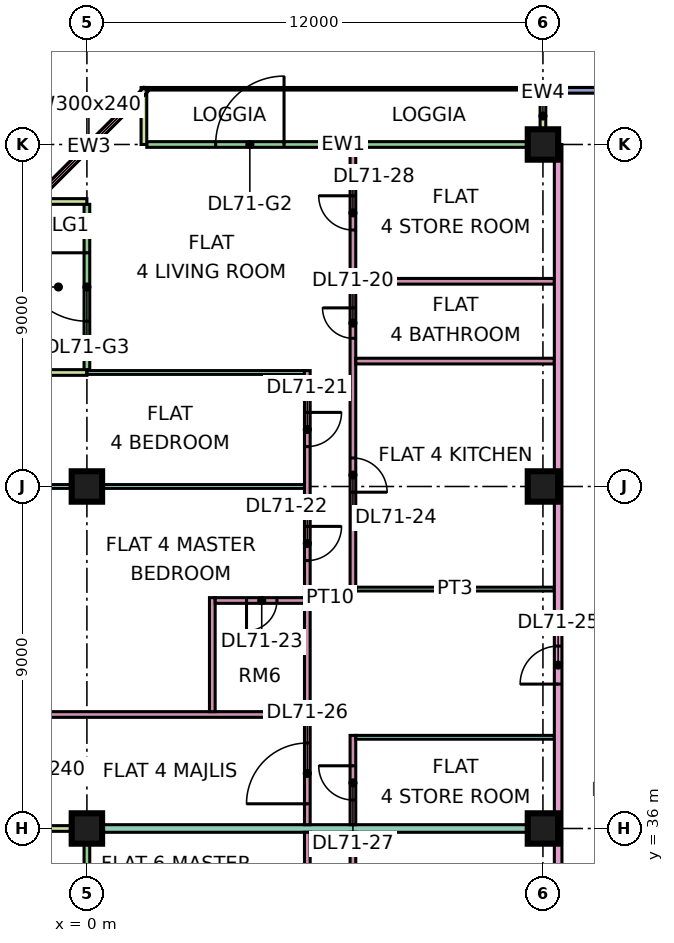
"""IFC4 building model, lengths in metres.
Left out: names, types, materials, properties, quantities, classifications, styles, units other than length and angle.
Written with IfcOpenShell. Run it as: python <this file> out.ifc"""

import sys

from ifc_helpers import new_model, si_unit, direction, frame, frame_2d, origin, origin_2d, place, context, subcontext, project, spatial, rectangle, extrude, element, fill, save


model = new_model("IFC4")
c1 = context("Model", 3, precision=1e-05, world=origin(), true_north=direction((0.0, 1.0)))
c2 = subcontext(c1, "Body", "Model", "MODEL_VIEW")
j1 = project(units=[si_unit("LENGTHUNIT", "METRE"), si_unit("PLANEANGLEUNIT", "RADIAN")], contexts=[c1])
p1 = place(None, origin())
s1 = spatial("IfcSite", under=j1, at=p1, CompositionType="ELEMENT")
p2 = place(p1, origin())
s2 = spatial("IfcBuilding", under=s1, at=p2, CompositionType="ELEMENT")
p3 = place(p2, frame((0.0, 0.0, 303.4)))
s3 = spatial("IfcBuildingStorey", under=s2, at=p3, CompositionType="ELEMENT", Elevation=303.4)
p4 = place(p3, frame((0.0, 36.0, 0.0), z_axis=(0.0, 0.0, 1.0), x_axis=(1.0, 0.0, 0.0)))
e1 = element("IfcColumn", 1, at=p4, inside=s3, PredefinedType="COLUMN", context=c2, shape_type="SweptSolid", body=[
    extrude(rectangle(XDim=0.8, YDim=0.8, at=origin_2d()), origin(), (0.0, 0.0, 1.0), 3.75),
])
for number, where, z_axis, x_axis in (
    (2, (0.0, 45.0, 0.0), (0.0, 0.0, 1.0), (1.0, 0.0, 0.0)),
    (3, (12.0, 36.0, 0.0), (0.0, 0.0, 1.0), (1.0, 0.0, 0.0)),
    (4, (12.0, 45.0, 0.0), (0.0, 0.0, 1.0), (1.0, 0.0, 0.0)),
    (5, (12.0, 54.0, 0.0), (0.0, 0.0, 1.0), (1.0, 0.0, 0.0)),
):
    element("IfcColumn", number, at=place(p3, frame(where, z_axis=z_axis, x_axis=x_axis)), inside=s3, PredefinedType="COLUMN", context=c2, shape_type="SweptSolid", body=[
        extrude(rectangle(XDim=0.8, YDim=0.8, at=origin_2d()), origin(), (0.0, 0.0, 1.0), 3.75),
    ])
p5 = place(p3, frame((22.5, 55.425, 0.0), z_axis=(0.0, 0.0, 1.0), x_axis=(-1.0, 0.0, 0.0)))
e6 = element("IfcWall", 6, at=p5, inside=s3, PredefinedType="SOLIDWALL", context=c2, shape_type="SweptSolid", body=[
    extrude(rectangle(XDim=10.425, YDim=0.15, at=frame_2d((5.212, 0.0))), origin(), (0.0, 0.0, 1.0), 3.35),
])
p6 = place(p5, frame((1.05, 0.0, 0.45)))
e7 = element("IfcOpeningElement", 7, at=p6, cuts=e6, PredefinedType="OPENING", context=c2, shape_type="SweptSolid", body=[
    extrude(rectangle(XDim=4.8, YDim=2.4, at=frame_2d((2.4, 1.2))), frame((0.0, 0.085, 0.0), z_axis=(0.0, -1.0, 0.0), x_axis=(1.0, 0.0, 0.0)), (0.0, 0.0, 1.0), 0.17),
])
p7 = place(p3, frame((11.925, 54.0, 0.0), z_axis=(0.0, 0.0, 1.0), x_axis=(-1.0, 0.0, 0.0)))
e8 = element("IfcWall", 8, at=p7, inside=s3, PredefinedType="SOLIDWALL", context=c2, shape_type="SweptSolid", body=[
    extrude(rectangle(XDim=10.35, YDim=0.15, at=frame_2d((5.175, 0.0))), origin(), (0.0, 0.0, 1.0), 3.35),
])
p8 = place(p7, frame((6.738, 0.0, 0.0)))
e9 = element("IfcOpeningElement", 9, at=p8, cuts=e8, PredefinedType="OPENING", context=c2, shape_type="SweptSolid", body=[
    extrude(rectangle(XDim=1.8, YDim=2.4, at=frame_2d((0.9, 1.2))), frame((0.0, 0.085, 0.0), z_axis=(0.0, -1.0, 0.0), x_axis=(1.0, 0.0, 0.0)), (0.0, 0.0, 1.0), 0.17),
])
for number, where, z_axis, x_axis in (
    (10, (12.0, 55.5, 0.0), (0.0, 0.0, 1.0), (0.0, -1.0, 0.0)),
    (11, (1.5, 55.5, 0.0), (0.0, 0.0, 1.0), (0.0, -1.0, 0.0)),
):
    element("IfcWall", number, at=place(p3, frame(where, z_axis=z_axis, x_axis=x_axis)), inside=s3, PredefinedType="SOLIDWALL", context=c2, shape_type="SweptSolid", body=[
        extrude(rectangle(XDim=1.5, YDim=0.15, at=frame_2d((0.75, 0.0))), origin(), (0.0, 0.0, 1.0), 3.35),
    ])
p9 = place(p3, frame((1.553, 55.447, 0.0), z_axis=(0.0, 0.0, 1.0), x_axis=(-0.707106781187, -0.707106781187, 0.0)))
e12 = element("IfcWall", 12, at=p9, inside=s3, PredefinedType="SOLIDWALL", context=c2, shape_type="SweptSolid", body=[
    extrude(rectangle(XDim=4.243, YDim=0.15, at=frame_2d((2.121, 0.0))), origin(), (0.0, 0.0, 1.0), 3.35),
])
p10 = place(p9, frame((0.621, 0.0, 0.45)))
e13 = element("IfcOpeningElement", 13, at=p10, cuts=e12, PredefinedType="OPENING", context=c2, shape_type="SweptSolid", body=[
    extrude(rectangle(XDim=3.0, YDim=2.4, at=frame_2d((1.5, 1.2))), frame((0.0, 0.085, 0.0), z_axis=(0.0, -1.0, 0.0), x_axis=(1.0, 0.0, 0.0)), (0.0, 0.0, 1.0), 0.17),
])
p11 = place(p3, frame((0.0, 52.425, 0.0), z_axis=(0.0, 0.0, 1.0), x_axis=(0.0, -1.0, 0.0)))
e14 = element("IfcWall", 14, at=p11, inside=s3, PredefinedType="SOLIDWALL", context=c2, shape_type="SweptSolid", body=[
    extrude(rectangle(XDim=4.35, YDim=0.15, at=frame_2d((2.175, 0.0))), origin(), (0.0, 0.0, 1.0), 3.35),
])
p12 = place(p11, frame((1.275, 0.0, 0.0)))
e15 = element("IfcOpeningElement", 15, at=p12, cuts=e14, PredefinedType="OPENING", context=c2, shape_type="SweptSolid", body=[
    extrude(rectangle(XDim=1.8, YDim=2.4, at=frame_2d((0.9, 1.2))), frame((0.0, 0.085, 0.0), z_axis=(0.0, -1.0, 0.0), x_axis=(1.0, 0.0, 0.0)), (0.0, 0.0, 1.0), 0.17),
])
for number, where, z_axis, x_axis in (
    (16, (-1.5, 52.5, 0.0), (0.0, 0.0, 1.0), (1.0, 0.0, 0.0)),
    (17, (-1.5, 48.0, 0.0), (0.0, 0.0, 1.0), (1.0, 0.0, 0.0)),
):
    element("IfcWall", number, at=place(p3, frame(where, z_axis=z_axis, x_axis=x_axis)), inside=s3, PredefinedType="SOLIDWALL", context=c2, shape_type="SweptSolid", body=[
        extrude(rectangle(XDim=1.5, YDim=0.15, at=frame_2d((0.75, 0.0))), origin(), (0.0, 0.0, 1.0), 3.35),
    ])
p13 = place(p3, frame((0.0, 35.925, 0.0), z_axis=(0.0, 0.0, 1.0), x_axis=(0.0, -1.0, 0.0)))
e18 = element("IfcWall", 18, at=p13, inside=s3, PredefinedType="SOLIDWALL", context=c2, shape_type="SweptSolid", body=[
    extrude(rectangle(XDim=11.85, YDim=0.15, at=frame_2d((5.925, 0.0))), origin(), (0.0, 0.0, 1.0), 3.35),
])
p14 = place(p13, frame((2.275, 0.0, 0.0)))
e19 = element("IfcOpeningElement", 19, at=p14, cuts=e18, PredefinedType="OPENING", context=c2, shape_type="SweptSolid", body=[
    extrude(rectangle(XDim=1.8, YDim=2.4, at=frame_2d((0.9, 1.2))), frame((0.0, 0.085, 0.0), z_axis=(0.0, -1.0, 0.0), x_axis=(1.0, 0.0, 0.0)), (0.0, 0.0, 1.0), 0.17),
])
p15 = place(p13, frame((6.525, 0.0, 0.45)))
e20 = element("IfcOpeningElement", 20, at=p15, cuts=e18, PredefinedType="OPENING", context=c2, shape_type="SweptSolid", body=[
    extrude(rectangle(XDim=1.8, YDim=2.4, at=frame_2d((0.9, 1.2))), frame((0.0, 0.085, 0.0), z_axis=(0.0, -1.0, 0.0), x_axis=(1.0, 0.0, 0.0)), (0.0, 0.0, 1.0), 0.17),
])
p16 = place(p13, frame((9.275, 0.0, 0.45)))
e21 = element("IfcOpeningElement", 21, at=p16, cuts=e18, PredefinedType="OPENING", context=c2, shape_type="SweptSolid", body=[
    extrude(rectangle(XDim=1.8, YDim=2.4, at=frame_2d((0.9, 1.2))), frame((0.0, 0.085, 0.0), z_axis=(0.0, -1.0, 0.0), x_axis=(1.0, 0.0, 0.0)), (0.0, 0.0, 1.0), 0.17),
])
p17 = place(p3, frame((-1.5, 36.0, 0.0), z_axis=(0.0, 0.0, 1.0), x_axis=(1.0, 0.0, 0.0)))
e22 = element("IfcWall", 22, at=p17, inside=s3, PredefinedType="SOLIDWALL", context=c2, shape_type="SweptSolid", body=[
    extrude(rectangle(XDim=1.5, YDim=0.15, at=frame_2d((0.75, 0.0))), origin(), (0.0, 0.0, 1.0), 3.35),
])
p18 = place(p3, frame((-1.351, 39.0, 0.0), z_axis=(0.0, 0.0, 1.0), x_axis=(1.0, 0.0, 0.0)))
e23 = element("IfcWall", 23, at=p18, inside=s3, PredefinedType="PARTITIONING", context=c2, shape_type="SweptSolid", body=[
    extrude(rectangle(XDim=7.076, YDim=0.15, at=frame_2d((3.538, 0.0))), origin(), (0.0, 0.0, 1.0), 3.35),
])
p19 = place(p3, frame((-1.351, 45.0, 0.0), z_axis=(0.0, 0.0, 1.0), x_axis=(1.0, 0.0, 0.0)))
e24 = element("IfcWall", 24, at=p19, inside=s3, PredefinedType="PARTITIONING", context=c2, shape_type="SweptSolid", body=[
    extrude(rectangle(XDim=7.076, YDim=0.1, at=frame_2d((3.538, 0.0))), origin(), (0.0, 0.0, 1.0), 3.35),
])
e25 = element("IfcWall", 25, at=p4, inside=s3, PredefinedType="PARTITIONING", context=c2, shape_type="SweptSolid", body=[
    extrude(rectangle(XDim=12.3, YDim=0.2, at=frame_2d((6.15, 0.0))), origin(), (0.0, 0.0, 1.0), 3.35),
])
p20 = place(p3, frame((0.0, 48.0, 0.0), z_axis=(0.0, 0.0, 1.0), x_axis=(1.0, 0.0, 0.0)))
e26 = element("IfcWall", 26, at=p20, inside=s3, PredefinedType="PARTITIONING", context=c2, shape_type="SweptSolid", body=[
    extrude(rectangle(XDim=5.725, YDim=0.1, at=frame_2d((2.863, 0.0))), origin(), (0.0, 0.0, 1.0), 3.35),
])
p21 = place(p3, frame((3.3, 39.075, 0.0), z_axis=(0.0, 0.0, 1.0), x_axis=(0.0, 1.0, 0.0)))
e27 = element("IfcWall", 27, at=p21, inside=s3, PredefinedType="PARTITIONING", context=c2, shape_type="SweptSolid", body=[
    extrude(rectangle(XDim=3.0, YDim=0.15, at=frame_2d((1.5, 0.0))), origin(), (0.0, 0.0, 1.0), 3.35),
])
p22 = place(p3, frame((3.375, 42.0, 0.0), z_axis=(0.0, 0.0, 1.0), x_axis=(1.0, 0.0, 0.0)))
e28 = element("IfcWall", 28, at=p22, inside=s3, PredefinedType="PARTITIONING", context=c2, shape_type="SweptSolid", body=[
    extrude(rectangle(XDim=2.35, YDim=0.15, at=frame_2d((1.175, 0.0))), origin(), (0.0, 0.0, 1.0), 3.35),
])
p23 = place(p22, frame((0.825, 0.0, 0.0)))
e29 = element("IfcOpeningElement", 29, at=p23, cuts=e28, PredefinedType="OPENING", context=c2, shape_type="SweptSolid", body=[
    extrude(rectangle(XDim=0.8, YDim=2.1, at=frame_2d((0.4, 1.05))), frame((0.0, 0.085, 0.0), z_axis=(0.0, -1.0, 0.0), x_axis=(1.0, 0.0, 0.0)), (0.0, 0.0, 1.0), 0.17),
])
p24 = place(p3, frame((5.8, 29.925, 0.0), z_axis=(0.0, 0.0, 1.0), x_axis=(0.0, 1.0, 0.0)))
e30 = element("IfcWall", 30, at=p24, inside=s3, PredefinedType="PARTITIONING", context=c2, shape_type="SweptSolid", body=[
    extrude(rectangle(XDim=5.975, YDim=0.15, at=frame_2d((2.987, 0.0))), origin(), (0.0, 0.0, 1.0), 3.35),
])
p25 = place(p24, frame((4.125, 0.0, 0.0)))
e31 = element("IfcOpeningElement", 31, at=p25, cuts=e30, PredefinedType="OPENING", context=c2, shape_type="SweptSolid", body=[
    extrude(rectangle(XDim=0.9, YDim=2.1, at=frame_2d((0.45, 1.05))), frame((0.0, 0.085, 0.0), z_axis=(0.0, -1.0, 0.0), x_axis=(1.0, 0.0, 0.0)), (0.0, 0.0, 1.0), 0.17),
])
p26 = place(p3, frame((5.8, 36.1, 0.0), z_axis=(0.0, 0.0, 1.0), x_axis=(0.0, 1.0, 0.0)))
e32 = element("IfcWall", 32, at=p26, inside=s3, PredefinedType="PARTITIONING", context=c2, shape_type="SweptSolid", body=[
    extrude(rectangle(XDim=11.95, YDim=0.15, at=frame_2d((5.975, 0.0))), origin(), (0.0, 0.0, 1.0), 3.35),
])
p27 = place(p26, frame((9.95, 0.0, 0.0)))
e33 = element("IfcOpeningElement", 33, at=p27, cuts=e32, PredefinedType="OPENING", context=c2, shape_type="SweptSolid", body=[
    extrude(rectangle(XDim=0.9, YDim=2.1, at=frame_2d((0.45, 1.05))), frame((0.0, 0.085, 0.0), z_axis=(0.0, -1.0, 0.0), x_axis=(1.0, 0.0, 0.0)), (0.0, 0.0, 1.0), 0.17),
])
p28 = place(p26, frame((6.95, 0.0, 0.0)))
e34 = element("IfcOpeningElement", 34, at=p28, cuts=e32, PredefinedType="OPENING", context=c2, shape_type="SweptSolid", body=[
    extrude(rectangle(XDim=0.9, YDim=2.1, at=frame_2d((0.45, 1.05))), frame((0.0, 0.085, 0.0), z_axis=(0.0, -1.0, 0.0), x_axis=(1.0, 0.0, 0.0)), (0.0, 0.0, 1.0), 0.17),
])
p29 = place(p26, frame((0.55, 0.0, 0.0)))
e35 = element("IfcOpeningElement", 35, at=p29, cuts=e32, PredefinedType="OPENING", context=c2, shape_type="SweptSolid", body=[
    extrude(rectangle(XDim=1.6, YDim=2.1, at=frame_2d((0.8, 1.05))), frame((0.0, 0.085, 0.0), z_axis=(0.0, -1.0, 0.0), x_axis=(1.0, 0.0, 0.0)), (0.0, 0.0, 1.0), 0.17),
])
p30 = place(p3, frame((7.0, 26.325, 0.0), z_axis=(0.0, 0.0, 1.0), x_axis=(0.0, 1.0, 0.0)))
e36 = element("IfcWall", 36, at=p30, inside=s3, PredefinedType="PARTITIONING", context=c2, shape_type="SweptSolid", body=[
    extrude(rectangle(XDim=9.575, YDim=0.15, at=frame_2d((4.788, 0.0))), origin(), (0.0, 0.0, 1.0), 3.35),
])
p31 = place(p30, frame((6.525, 0.0, 0.0)))
e37 = element("IfcOpeningElement", 37, at=p31, cuts=e36, PredefinedType="OPENING", context=c2, shape_type="SweptSolid", body=[
    extrude(rectangle(XDim=0.9, YDim=2.1, at=frame_2d((0.45, 1.05))), frame((0.0, 0.085, 0.0), z_axis=(0.0, -1.0, 0.0), x_axis=(1.0, 0.0, 0.0)), (0.0, 0.0, 1.0), 0.17),
])
p32 = place(p3, frame((7.0, 36.1, 0.0), z_axis=(0.0, 0.0, 1.0), x_axis=(0.0, 1.0, 0.0)))
e38 = element("IfcWall", 38, at=p32, inside=s3, PredefinedType="PARTITIONING", context=c2, shape_type="SweptSolid", body=[
    extrude(rectangle(XDim=2.35, YDim=0.15, at=frame_2d((1.175, 0.0))), origin(), (0.0, 0.0, 1.0), 3.35),
])
p33 = place(p32, frame((0.65, 0.0, 0.0)))
e39 = element("IfcOpeningElement", 39, at=p33, cuts=e38, PredefinedType="OPENING", context=c2, shape_type="SweptSolid", body=[
    extrude(rectangle(XDim=0.9, YDim=2.1, at=frame_2d((0.45, 1.05))), frame((0.0, 0.085, 0.0), z_axis=(0.0, -1.0, 0.0), x_axis=(1.0, 0.0, 0.0)), (0.0, 0.0, 1.0), 0.17),
])
p34 = place(p3, frame((7.0, 42.25, 0.0), z_axis=(0.0, 0.0, 1.0), x_axis=(0.0, 1.0, 0.0)))
e40 = element("IfcWall", 40, at=p34, inside=s3, PredefinedType="PARTITIONING", context=c2, shape_type="SweptSolid", body=[
    extrude(rectangle(XDim=11.676, YDim=0.15, at=frame_2d((5.838, 0.0))), origin(), (0.0, 0.0, 1.0), 3.35),
])
p35 = place(p34, frame((6.65, 0.0, 0.0)))
e41 = element("IfcOpeningElement", 41, at=p35, cuts=e40, PredefinedType="OPENING", context=c2, shape_type="SweptSolid", body=[
    extrude(rectangle(XDim=0.8, YDim=2.1, at=frame_2d((0.4, 1.05))), frame((0.0, 0.085, 0.0), z_axis=(0.0, -1.0, 0.0), x_axis=(1.0, 0.0, 0.0)), (0.0, 0.0, 1.0), 0.17),
])
p36 = place(p34, frame((2.6, 0.0, 0.0)))
e42 = element("IfcOpeningElement", 42, at=p36, cuts=e40, PredefinedType="OPENING", context=c2, shape_type="SweptSolid", body=[
    extrude(rectangle(XDim=0.9, YDim=2.1, at=frame_2d((0.45, 1.05))), frame((0.0, 0.085, 0.0), z_axis=(0.0, -1.0, 0.0), x_axis=(1.0, 0.0, 0.0)), (0.0, 0.0, 1.0), 0.17),
])
p37 = place(p34, frame((9.5, 0.0, 0.0)))
e43 = element("IfcOpeningElement", 43, at=p37, cuts=e40, PredefinedType="OPENING", context=c2, shape_type="SweptSolid", body=[
    extrude(rectangle(XDim=0.9, YDim=2.1, at=frame_2d((0.45, 1.05))), frame((0.0, 0.085, 0.0), z_axis=(0.0, -1.0, 0.0), x_axis=(1.0, 0.0, 0.0)), (0.0, 0.0, 1.0), 0.17),
])
for number, where, z_axis, x_axis in (
    (44, (7.075, 38.4, 0.0), (0.0, 0.0, 1.0), (1.0, 0.0, 0.0)),
    (45, (7.075, 42.3, 0.0), (0.0, 0.0, 1.0), (1.0, 0.0, 0.0)),
):
    element("IfcWall", number, at=place(p3, frame(where, z_axis=z_axis, x_axis=x_axis)), inside=s3, PredefinedType="PARTITIONING", context=c2, shape_type="SweptSolid", body=[
        extrude(rectangle(XDim=5.225, YDim=0.1, at=frame_2d((2.613, 0.0))), origin(), (0.0, 0.0, 1.0), 3.35),
    ])
for number, where, z_axis, x_axis in (
    (46, (7.075, 48.3, 0.0), (0.0, 0.0, 1.0), (1.0, 0.0, 0.0)),
    (47, (7.075, 50.4, 0.0), (0.0, 0.0, 1.0), (1.0, 0.0, 0.0)),
):
    element("IfcWall", number, at=place(p3, frame(where, z_axis=z_axis, x_axis=x_axis)), inside=s3, PredefinedType="PARTITIONING", context=c2, shape_type="SweptSolid", body=[
        extrude(rectangle(XDim=5.225, YDim=0.15, at=frame_2d((2.613, 0.0))), origin(), (0.0, 0.0, 1.0), 3.35),
    ])
p38 = place(p3, frame((12.4, 20.0, 0.0), z_axis=(0.0, 0.0, 1.0), x_axis=(0.0, 1.0, 0.0)))
e48 = element("IfcWall", 48, at=p38, inside=s3, PredefinedType="PARTITIONING", context=c2, shape_type="SweptSolid", body=[
    extrude(rectangle(XDim=34.0, YDim=0.2, at=frame_2d((17.0, 0.0))), origin(), (0.0, 0.0, 1.0), 3.35),
])
p39 = place(p38, frame((19.8, 0.0, 0.0)))
e49 = element("IfcOpeningElement", 49, at=p39, cuts=e48, PredefinedType="OPENING", context=c2, shape_type="SweptSolid", body=[
    extrude(rectangle(XDim=1.0, YDim=2.1, at=frame_2d((0.5, 1.05))), frame((0.0, 0.11, 0.0), z_axis=(0.0, -1.0, 0.0), x_axis=(1.0, 0.0, 0.0)), (0.0, 0.0, 1.0), 0.22),
])
p40 = place(p38, frame((0.6, 0.0, 0.0)))
e50 = element("IfcOpeningElement", 50, at=p40, cuts=e48, PredefinedType="OPENING", context=c2, shape_type="SweptSolid", body=[
    extrude(rectangle(XDim=1.2, YDim=2.1, at=frame_2d((0.6, 1.05))), frame((0.0, 0.11, 0.0), z_axis=(0.0, -1.0, 0.0), x_axis=(1.0, 0.0, 0.0)), (0.0, 0.0, 1.0), 0.22),
])
p41 = place(p38, frame((4.5, 0.0, 0.0)))
e51 = element("IfcOpeningElement", 51, at=p41, cuts=e48, PredefinedType="OPENING", context=c2, shape_type="SweptSolid", body=[
    extrude(rectangle(XDim=1.0, YDim=2.1, at=frame_2d((0.5, 1.05))), frame((0.0, 0.11, 0.0), z_axis=(0.0, -1.0, 0.0), x_axis=(1.0, 0.0, 0.0)), (0.0, 0.0, 1.0), 0.22),
])
p42 = place(p8, frame((1.8, 0.0, 0.0), z_axis=(0.0, 0.0, 1.0), x_axis=(-1.0, 0.0, 0.0)))
e52 = element("IfcDoor", 52, at=p42, inside=s3, OperationType="DOUBLE_DOOR_SINGLE_SWING", PredefinedType="DOOR", context=c2, shape_type="SweptSolid", body=[
    extrude(rectangle(XDim=1.8, YDim=2.4, at=frame_2d((0.9, 1.2))), frame((0.0, 0.025, 0.0), z_axis=(0.0, -1.0, 0.0), x_axis=(1.0, 0.0, 0.0)), (0.0, 0.0, 1.0), 0.05),
])
fill(e9, e52)
p43 = place(p10, origin())
e53 = element("IfcWindow", 53, at=p43, inside=s3, PartitioningType="SINGLE_PANEL", PredefinedType="WINDOW", context=c2, shape_type="SweptSolid", body=[
    extrude(rectangle(XDim=3.0, YDim=2.4, at=frame_2d((1.5, 1.2))), frame((0.0, 0.03, 0.0), z_axis=(0.0, -1.0, 0.0), x_axis=(1.0, 0.0, 0.0)), (0.0, 0.0, 1.0), 0.06),
])
fill(e13, e53)
p44 = place(p12, frame((1.8, 0.0, 0.0), z_axis=(0.0, 0.0, 1.0), x_axis=(-1.0, 0.0, 0.0)))
e54 = element("IfcDoor", 54, at=p44, inside=s3, OperationType="DOUBLE_DOOR_SINGLE_SWING", PredefinedType="DOOR", context=c2, shape_type="SweptSolid", body=[
    extrude(rectangle(XDim=1.8, YDim=2.4, at=frame_2d((0.9, 1.2))), frame((0.0, 0.025, 0.0), z_axis=(0.0, -1.0, 0.0), x_axis=(1.0, 0.0, 0.0)), (0.0, 0.0, 1.0), 0.05),
])
fill(e15, e54)
p45 = place(p35, frame((0.8, 0.0, 0.0), z_axis=(0.0, 0.0, 1.0), x_axis=(-1.0, 0.0, 0.0)))
e55 = element("IfcDoor", 55, at=p45, inside=s3, OperationType="SINGLE_SWING_RIGHT", PredefinedType="DOOR", context=c2, shape_type="SweptSolid", body=[
    extrude(rectangle(XDim=0.8, YDim=2.1, at=frame_2d((0.4, 1.05))), frame((0.0, 0.025, 0.0), z_axis=(0.0, -1.0, 0.0), x_axis=(1.0, 0.0, 0.0)), (0.0, 0.0, 1.0), 0.05),
])
fill(e41, e55)
p46 = place(p27, origin())
e56 = element("IfcDoor", 56, at=p46, inside=s3, OperationType="SINGLE_SWING_RIGHT", PredefinedType="DOOR", context=c2, shape_type="SweptSolid", body=[
    extrude(rectangle(XDim=0.9, YDim=2.1, at=frame_2d((0.45, 1.05))), frame((0.0, 0.025, 0.0), z_axis=(0.0, -1.0, 0.0), x_axis=(1.0, 0.0, 0.0)), (0.0, 0.0, 1.0), 0.05),
])
fill(e33, e56)
p47 = place(p28, origin())
e57 = element("IfcDoor", 57, at=p47, inside=s3, OperationType="SINGLE_SWING_RIGHT", PredefinedType="DOOR", context=c2, shape_type="SweptSolid", body=[
    extrude(rectangle(XDim=0.9, YDim=2.1, at=frame_2d((0.45, 1.05))), frame((0.0, 0.025, 0.0), z_axis=(0.0, -1.0, 0.0), x_axis=(1.0, 0.0, 0.0)), (0.0, 0.0, 1.0), 0.05),
])
fill(e34, e57)
p48 = place(p23, frame((0.8, 0.0, 0.0), z_axis=(0.0, 0.0, 1.0), x_axis=(-1.0, 0.0, 0.0)))
e58 = element("IfcDoor", 58, at=p48, inside=s3, OperationType="SINGLE_SWING_LEFT", PredefinedType="DOOR", context=c2, shape_type="SweptSolid", body=[
    extrude(rectangle(XDim=0.8, YDim=2.1, at=frame_2d((0.4, 1.05))), frame((0.0, 0.025, 0.0), z_axis=(0.0, -1.0, 0.0), x_axis=(1.0, 0.0, 0.0)), (0.0, 0.0, 1.0), 0.05),
])
fill(e29, e58)
p49 = place(p36, frame((0.9, 0.0, 0.0), z_axis=(0.0, 0.0, 1.0), x_axis=(-1.0, 0.0, 0.0)))
e59 = element("IfcDoor", 59, at=p49, inside=s3, OperationType="SINGLE_SWING_LEFT", PredefinedType="DOOR", context=c2, shape_type="SweptSolid", body=[
    extrude(rectangle(XDim=0.9, YDim=2.1, at=frame_2d((0.45, 1.05))), frame((0.0, 0.025, 0.0), z_axis=(0.0, -1.0, 0.0), x_axis=(1.0, 0.0, 0.0)), (0.0, 0.0, 1.0), 0.05),
])
fill(e42, e59)
p50 = place(p39, origin())
e60 = element("IfcDoor", 60, at=p50, inside=s3, OperationType="SINGLE_SWING_LEFT", PredefinedType="DOOR", context=c2, shape_type="SweptSolid", body=[
    extrude(rectangle(XDim=1.0, YDim=2.1, at=frame_2d((0.5, 1.05))), frame((0.0, 0.025, 0.0), z_axis=(0.0, -1.0, 0.0), x_axis=(1.0, 0.0, 0.0)), (0.0, 0.0, 1.0), 0.05),
])
fill(e49, e60)
p51 = place(p29, origin())
e61 = element("IfcDoor", 61, at=p51, inside=s3, OperationType="DOUBLE_DOOR_SINGLE_SWING", PredefinedType="DOOR", context=c2, shape_type="SweptSolid", body=[
    extrude(rectangle(XDim=1.6, YDim=2.1, at=frame_2d((0.8, 1.05))), frame((0.0, 0.025, 0.0), z_axis=(0.0, -1.0, 0.0), x_axis=(1.0, 0.0, 0.0)), (0.0, 0.0, 1.0), 0.05),
])
fill(e35, e61)
p52 = place(p33, frame((0.9, 0.0, 0.0), z_axis=(0.0, 0.0, 1.0), x_axis=(-1.0, 0.0, 0.0)))
e62 = element("IfcDoor", 62, at=p52, inside=s3, OperationType="SINGLE_SWING_RIGHT", PredefinedType="DOOR", context=c2, shape_type="SweptSolid", body=[
    extrude(rectangle(XDim=0.9, YDim=2.1, at=frame_2d((0.45, 1.05))), frame((0.0, 0.025, 0.0), z_axis=(0.0, -1.0, 0.0), x_axis=(1.0, 0.0, 0.0)), (0.0, 0.0, 1.0), 0.05),
])
fill(e39, e62)
p53 = place(p37, frame((0.9, 0.0, 0.0), z_axis=(0.0, 0.0, 1.0), x_axis=(-1.0, 0.0, 0.0)))
e63 = element("IfcDoor", 63, at=p53, inside=s3, OperationType="SINGLE_SWING_RIGHT", PredefinedType="DOOR", context=c2, shape_type="SweptSolid", body=[
    extrude(rectangle(XDim=0.9, YDim=2.1, at=frame_2d((0.45, 1.05))), frame((0.0, 0.025, 0.0), z_axis=(0.0, -1.0, 0.0), x_axis=(1.0, 0.0, 0.0)), (0.0, 0.0, 1.0), 0.05),
])
fill(e43, e63)
save(model, sys.argv[1])
